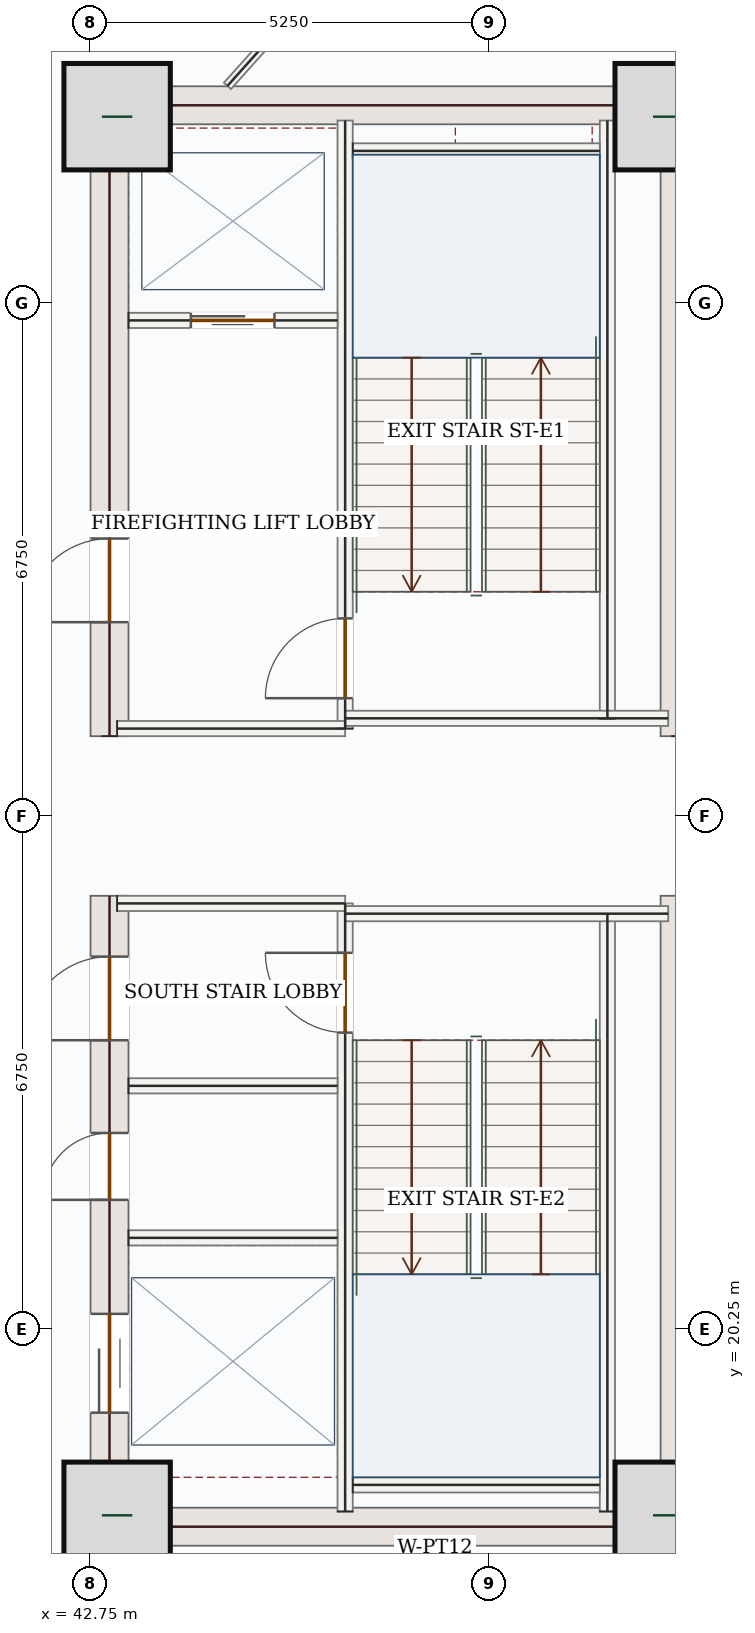
"""IFC4 building model, lengths in metres.
Left out: names, types, materials, properties, quantities, classifications, styles, units other than length and angle.
Written with IfcOpenShell. Run it as: python <this file> out.ifc"""

import sys

from ifc_helpers import new_model, si_unit, direction, frame, frame_2d, origin, origin_2d, place, context, subcontext, project, spatial, rectangle, extrude, source, transform, mapped, element, fill, save


model = new_model("IFC4")
c1 = context("Model", 3, precision=1e-05, world=origin(), true_north=direction((0.0, 1.0)))
c2 = subcontext(c1, "Body", "Model", "MODEL_VIEW")
j1 = project(units=[si_unit("LENGTHUNIT", "METRE"), si_unit("PLANEANGLEUNIT", "RADIAN")], contexts=[c1])
p1 = place(None, origin())
s1 = spatial("IfcSite", under=j1, at=p1, CompositionType="ELEMENT")
p2 = place(p1, origin())
s2 = spatial("IfcBuilding", under=s1, at=p2, CompositionType="ELEMENT")
p3 = place(p2, frame((0.0, 0.0, 75.3)))
s3 = spatial("IfcBuildingStorey", under=s2, at=p3, CompositionType="ELEMENT", Elevation=75.3)
p4 = place(p3, frame((43.0, 17.4, 0.0), z_axis=(0.0, 0.0, 1.0), x_axis=(0.0, 1.0, 0.0)))
e1 = element("IfcWall", 1, at=p4, inside=s3, PredefinedType="SHEAR", context=c2, shape_type="SweptSolid", body=[
    extrude(rectangle(XDim=8.55, YDim=0.5, at=frame_2d((4.275, 0.0))), origin(), (0.0, 0.0, 1.0), 3.95),
])
p5 = place(p4, frame((6.65, 0.0, 0.0)))
e2 = element("IfcOpeningElement", 2, at=p5, cuts=e1, PredefinedType="OPENING", context=c2, shape_type="SweptSolid", body=[
    extrude(rectangle(XDim=1.1, YDim=2.2, at=frame_2d((0.55, 1.1))), frame((0.0, 0.26, 0.0), z_axis=(0.0, -1.0, 0.0), x_axis=(1.0, 0.0, 0.0)), (0.0, 0.0, 1.0), 0.52),
])
p6 = place(p4, frame((1.75, 0.0, 0.0)))
e3 = element("IfcOpeningElement", 3, at=p6, cuts=e1, PredefinedType="OPENING", context=c2, shape_type="SweptSolid", body=[
    extrude(rectangle(XDim=1.3, YDim=2.2, at=frame_2d((0.65, 1.1))), frame((0.0, 0.26, 0.0), z_axis=(0.0, -1.0, 0.0), x_axis=(1.0, 0.0, 0.0)), (0.0, 0.0, 1.0), 0.52),
])
p7 = place(p4, frame((4.55, 0.0, 0.0)))
e4 = element("IfcOpeningElement", 4, at=p7, cuts=e1, PredefinedType="OPENING", context=c2, shape_type="SweptSolid", body=[
    extrude(rectangle(XDim=0.88, YDim=2.1, at=frame_2d((0.44, 1.05))), frame((0.0, 0.26, 0.0), z_axis=(0.0, -1.0, 0.0), x_axis=(1.0, 0.0, 0.0)), (0.0, 0.0, 1.0), 0.52),
])
p8 = place(p3, frame((43.0, 28.05, 0.0), z_axis=(0.0, 0.0, 1.0), x_axis=(0.0, 1.0, 0.0)))
e5 = element("IfcWall", 5, at=p8, inside=s3, PredefinedType="SHEAR", context=c2, shape_type="SweptSolid", body=[
    extrude(rectangle(XDim=8.55, YDim=0.5, at=frame_2d((4.275, 0.0))), origin(), (0.0, 0.0, 1.0), 3.95),
])
p9 = place(p8, frame((1.5, 0.0, 0.0)))
e6 = element("IfcOpeningElement", 6, at=p9, cuts=e5, PredefinedType="OPENING", context=c2, shape_type="SweptSolid", body=[
    extrude(rectangle(XDim=1.1, YDim=2.2, at=frame_2d((0.55, 1.1))), frame((0.0, 0.26, 0.0), z_axis=(0.0, -1.0, 0.0), x_axis=(1.0, 0.0, 0.0)), (0.0, 0.0, 1.0), 0.52),
])
m1 = source(origin(), c2, "Body", "SweptSolid", [
    extrude(rectangle(XDim=8.55, YDim=0.5, at=frame_2d((4.275, 0.0))), origin(), (0.0, 0.0, 1.0), 3.95),
])
for number, where, z_axis, x_axis in (
    (7, (50.5, 17.4, 0.0), (0.0, 0.0, 1.0), (0.0, 1.0, 0.0)),
    (8, (50.5, 28.05, 0.0), (0.0, 0.0, 1.0), (0.0, 1.0, 0.0)),
):
    element("IfcWall", number, at=place(p3, frame(where, z_axis=z_axis, x_axis=x_axis)), inside=s3, PredefinedType="SHEAR", context=c2, shape_type="MappedRepresentation", body=[
        mapped(m1, transform((0.0, 0.0, 0.0), x_axis=(1.0, 0.0, 0.0), y_axis=(0.0, 1.0, 0.0), z_axis=(0.0, 0.0, 1.0), scale=1.0)),
    ])
m2 = source(origin(), c2, "Body", "SweptSolid", [
    extrude(rectangle(XDim=7.0, YDim=0.5, at=frame_2d((3.5, 0.0))), origin(), (0.0, 0.0, 1.0), 3.95),
])
for number, where, z_axis, x_axis in (
    (9, (43.25, 17.65, 0.0), (0.0, 0.0, 1.0), (1.0, 0.0, 0.0)),
    (10, (43.25, 36.35, 0.0), (0.0, 0.0, 1.0), (1.0, 0.0, 0.0)),
):
    element("IfcWall", number, at=place(p3, frame(where, z_axis=z_axis, x_axis=x_axis)), inside=s3, PredefinedType="SHEAR", context=c2, shape_type="MappedRepresentation", body=[
        mapped(m2, transform((0.0, 0.0, 0.0), x_axis=(1.0, 0.0, 0.0), y_axis=(0.0, 1.0, 0.0), z_axis=(0.0, 0.0, 1.0), scale=1.0)),
    ])
m3 = source(origin(), c2, "Body", "SweptSolid", [
    extrude(rectangle(XDim=1.4, YDim=1.4, at=origin_2d()), origin(), (0.0, 0.0, 1.0), 4.2),
])
for number, where, z_axis, x_axis in (
    (11, (43.1, 17.8, 0.0), (0.0, 0.0, 1.0), (1.0, 0.0, 0.0)),
    (12, (50.35, 17.8, 0.0), (0.0, 0.0, 1.0), (1.0, 0.0, 0.0)),
    (13, (43.1, 36.2, 0.0), (0.0, 0.0, 1.0), (1.0, 0.0, 0.0)),
    (14, (50.35, 36.2, 0.0), (0.0, 0.0, 1.0), (1.0, 0.0, 0.0)),
):
    element("IfcColumn", number, at=place(p3, frame(where, z_axis=z_axis, x_axis=x_axis)), inside=s3, PredefinedType="COLUMN", context=c2, shape_type="MappedRepresentation", body=[
        mapped(m3, transform((0.0, 0.0, 0.0), x_axis=(1.0, 0.0, 0.0), y_axis=(0.0, 1.0, 0.0), z_axis=(0.0, 0.0, 1.0), scale=1.0)),
    ])
p10 = place(p3, frame((53.06, 18.458, 0.0), z_axis=(0.0, 0.0, 1.0), x_axis=(-0.707106781187, -0.707106781187, 0.0)))
e15 = element("IfcWall", 15, at=p10, inside=s3, PredefinedType="SOLIDWALL", context=c2, shape_type="SweptSolid", body=[
    extrude(rectangle(XDim=5.258, YDim=0.32, at=frame_2d((2.629, 0.0))), origin(), (0.0, 0.0, 1.0), 3.95),
])
p11 = place(p10, frame((1.429, 0.0, 0.85)))
e16 = element("IfcOpeningElement", 16, at=p11, cuts=e15, PredefinedType="OPENING", context=c2, shape_type="SweptSolid", body=[
    extrude(rectangle(XDim=2.4, YDim=1.8, at=frame_2d((1.2, 0.9))), frame((0.0, 0.17, 0.0), z_axis=(0.0, -1.0, 0.0), x_axis=(1.0, 0.0, 0.0)), (0.0, 0.0, 1.0), 0.34),
])
m4 = source(origin(), c2, "Body", "SweptSolid", [
    extrude(rectangle(XDim=5.258, YDim=0.32, at=frame_2d((2.629, 0.0))), origin(), (0.0, 0.0, 1.0), 3.95),
])
p12 = place(p3, frame((49.342, 39.26, 0.0), z_axis=(0.0, 0.0, 1.0), x_axis=(0.707106781187, -0.707106781187, 0.0)))
e17 = element("IfcWall", 17, at=p12, inside=s3, PredefinedType="SOLIDWALL", context=c2, shape_type="MappedRepresentation", body=[
    mapped(m4, transform((0.0, 0.0, 0.0), x_axis=(1.0, 0.0, 0.0), y_axis=(0.0, 1.0, 0.0), z_axis=(0.0, 0.0, 1.0), scale=1.0)),
])
m5 = source(origin(), c2, "Body", "SweptSolid", [
    extrude(rectangle(XDim=7.87, YDim=0.2, at=frame_2d((3.935, 0.0))), origin(), (0.0, 0.0, 1.0), 3.95),
])
for number, where, z_axis, x_axis in (
    (18, (49.55, 17.85, 0.0), (0.0, 0.0, 1.0), (0.0, 1.0, 0.0)),
    (19, (49.55, 28.28, 0.0), (0.0, 0.0, 1.0), (0.0, 1.0, 0.0)),
):
    element("IfcWall", number, at=place(p3, frame(where, z_axis=z_axis, x_axis=x_axis)), inside=s3, PredefinedType="SOLIDWALL", context=c2, shape_type="MappedRepresentation", body=[
        mapped(m5, transform((0.0, 0.0, 0.0), x_axis=(1.0, 0.0, 0.0), y_axis=(0.0, 1.0, 0.0), z_axis=(0.0, 0.0, 1.0), scale=1.0)),
    ])
p13 = place(p3, frame((46.1, 17.85, 0.0), z_axis=(0.0, 0.0, 1.0), x_axis=(0.0, 1.0, 0.0)))
e20 = element("IfcWall", 20, at=p13, inside=s3, PredefinedType="SOLIDWALL", context=c2, shape_type="SweptSolid", body=[
    extrude(rectangle(XDim=8.0, YDim=0.2, at=frame_2d((4.0, 0.0))), origin(), (0.0, 0.0, 1.0), 3.95),
])
p14 = place(p13, frame((6.3, 0.0, 0.0)))
e21 = element("IfcOpeningElement", 21, at=p14, cuts=e20, PredefinedType="OPENING", context=c2, shape_type="SweptSolid", body=[
    extrude(rectangle(XDim=1.05, YDim=2.15, at=frame_2d((0.525, 1.075))), frame((0.0, 0.11, 0.0), z_axis=(0.0, -1.0, 0.0), x_axis=(1.0, 0.0, 0.0)), (0.0, 0.0, 1.0), 0.22),
])
p15 = place(p3, frame((46.1, 28.15, 0.0), z_axis=(0.0, 0.0, 1.0), x_axis=(0.0, 1.0, 0.0)))
e22 = element("IfcWall", 22, at=p15, inside=s3, PredefinedType="SOLIDWALL", context=c2, shape_type="SweptSolid", body=[
    extrude(rectangle(XDim=8.0, YDim=0.2, at=frame_2d((4.0, 0.0))), origin(), (0.0, 0.0, 1.0), 3.95),
])
p16 = place(p15, frame((0.4, 0.0, 0.0)))
e23 = element("IfcOpeningElement", 23, at=p16, cuts=e22, PredefinedType="OPENING", context=c2, shape_type="SweptSolid", body=[
    extrude(rectangle(XDim=1.05, YDim=2.15, at=frame_2d((0.525, 1.075))), frame((0.0, 0.11, 0.0), z_axis=(0.0, -1.0, 0.0), x_axis=(1.0, 0.0, 0.0)), (0.0, 0.0, 1.0), 0.22),
])
m6 = source(origin(), c2, "Body", "SweptSolid", [
    extrude(rectangle(XDim=3.0, YDim=0.2, at=frame_2d((1.5, 0.0))), origin(), (0.0, 0.0, 1.0), 3.95),
])
p17 = place(p3, frame((43.1, 25.85, 0.0), z_axis=(0.0, 0.0, 1.0), x_axis=(1.0, 0.0, 0.0)))
e24 = element("IfcWall", 24, at=p17, inside=s3, PredefinedType="SOLIDWALL", context=c2, shape_type="MappedRepresentation", body=[
    mapped(m6, transform((0.0, 0.0, 0.0), x_axis=(1.0, 0.0, 0.0), y_axis=(0.0, 1.0, 0.0), z_axis=(0.0, 0.0, 1.0), scale=1.0)),
])
m7 = source(origin(), c2, "Body", "SweptSolid", [
    extrude(rectangle(XDim=4.25, YDim=0.2, at=frame_2d((2.125, 0.0))), origin(), (0.0, 0.0, 1.0), 3.95),
])
p18 = place(p3, frame((46.1, 25.715, 0.0), z_axis=(0.0, 0.0, 1.0), x_axis=(1.0, 0.0, 0.0)))
e25 = element("IfcWall", 25, at=p18, inside=s3, PredefinedType="SOLIDWALL", context=c2, shape_type="MappedRepresentation", body=[
    mapped(m7, transform((0.0, 0.0, 0.0), x_axis=(1.0, 0.0, 0.0), y_axis=(0.0, 1.0, 0.0), z_axis=(0.0, 0.0, 1.0), scale=1.0)),
])
p19 = place(p3, frame((43.1, 28.15, 0.0), z_axis=(0.0, 0.0, 1.0), x_axis=(1.0, 0.0, 0.0)))
e26 = element("IfcWall", 26, at=p19, inside=s3, PredefinedType="SOLIDWALL", context=c2, shape_type="MappedRepresentation", body=[
    mapped(m6, transform((0.0, 0.0, 0.0), x_axis=(1.0, 0.0, 0.0), y_axis=(0.0, 1.0, 0.0), z_axis=(0.0, 0.0, 1.0), scale=1.0)),
])
p20 = place(p3, frame((46.1, 28.285, 0.0), z_axis=(0.0, 0.0, 1.0), x_axis=(1.0, 0.0, 0.0)))
e27 = element("IfcWall", 27, at=p20, inside=s3, PredefinedType="SOLIDWALL", context=c2, shape_type="MappedRepresentation", body=[
    mapped(m7, transform((0.0, 0.0, 0.0), x_axis=(1.0, 0.0, 0.0), y_axis=(0.0, 1.0, 0.0), z_axis=(0.0, 0.0, 1.0), scale=1.0)),
])
m8 = source(origin(), c2, "Body", "SweptSolid", [
    extrude(rectangle(XDim=3.25, YDim=0.2, at=frame_2d((1.625, 0.0))), origin(), (0.0, 0.0, 1.0), 3.95),
])
for number, where, z_axis, x_axis in (
    (28, (46.2, 35.75, 0.0), (0.0, 0.0, 1.0), (1.0, 0.0, 0.0)),
    (29, (46.2, 18.2, 0.0), (0.0, 0.0, 1.0), (1.0, 0.0, 0.0)),
):
    element("IfcWall", number, at=place(p3, frame(where, z_axis=z_axis, x_axis=x_axis)), inside=s3, PredefinedType="SOLIDWALL", context=c2, shape_type="MappedRepresentation", body=[
        mapped(m8, transform((0.0, 0.0, 0.0), x_axis=(1.0, 0.0, 0.0), y_axis=(0.0, 1.0, 0.0), z_axis=(0.0, 0.0, 1.0), scale=1.0)),
    ])
p21 = place(p3, frame((43.25, 33.52, 0.0), z_axis=(0.0, 0.0, 1.0), x_axis=(1.0, 0.0, 0.0)))
e30 = element("IfcWall", 30, at=p21, inside=s3, PredefinedType="SOLIDWALL", context=c2, shape_type="SweptSolid", body=[
    extrude(rectangle(XDim=2.75, YDim=0.2, at=frame_2d((1.375, 0.0))), origin(), (0.0, 0.0, 1.0), 3.95),
])
p22 = place(p21, frame((0.82, 0.0, 0.0)))
e31 = element("IfcOpeningElement", 31, at=p22, cuts=e30, PredefinedType="OPENING", context=c2, shape_type="SweptSolid", body=[
    extrude(rectangle(XDim=1.1, YDim=2.15, at=frame_2d((0.55, 1.075))), frame((0.0, 0.11, 0.0), z_axis=(0.0, -1.0, 0.0), x_axis=(1.0, 0.0, 0.0)), (0.0, 0.0, 1.0), 0.22),
])
m9 = source(origin(), c2, "Body", "SweptSolid", [
    extrude(rectangle(XDim=2.75, YDim=0.2, at=frame_2d((1.375, 0.0))), origin(), (0.0, 0.0, 1.0), 3.95),
])
for number, where, z_axis, x_axis in (
    (32, (43.25, 23.45, 0.0), (0.0, 0.0, 1.0), (1.0, 0.0, 0.0)),
    (33, (43.25, 21.45, 0.0), (0.0, 0.0, 1.0), (1.0, 0.0, 0.0)),
):
    element("IfcWall", number, at=place(p3, frame(where, z_axis=z_axis, x_axis=x_axis)), inside=s3, PredefinedType="SOLIDWALL", context=c2, shape_type="MappedRepresentation", body=[
        mapped(m9, transform((0.0, 0.0, 0.0), x_axis=(1.0, 0.0, 0.0), y_axis=(0.0, 1.0, 0.0), z_axis=(0.0, 0.0, 1.0), scale=1.0)),
    ])
m10 = source(origin(), c2, "Body", "SweptSolid", [
    extrude(rectangle(XDim=1.099, YDim=0.125, at=frame_2d((0.549, 0.0))), origin(), (0.0, 0.0, 1.0), 3.95),
])
p23 = place(p3, frame((46.871, 17.395, 0.0), z_axis=(0.0, 0.0, 1.0), x_axis=(0.750977912422, -0.660327324177, 0.0)))
e34 = element("IfcWall", 34, at=p23, inside=s3, PredefinedType="PARTITIONING", context=c2, shape_type="MappedRepresentation", body=[
    mapped(m10, transform((0.0, 0.0, 0.0), x_axis=(1.0, 0.0, 0.0), y_axis=(0.0, 1.0, 0.0), z_axis=(0.0, 0.0, 1.0), scale=1.0)),
])
m11 = source(origin(), c2, "Body", "SweptSolid", [
    extrude(rectangle(XDim=3.348, YDim=0.125, at=frame_2d((1.674, 0.0))), origin(), (0.0, 0.0, 1.0), 3.95),
])
p24 = place(p3, frame((46.785, 39.099, 0.0), z_axis=(0.0, 0.0, 1.0), x_axis=(-0.667206176518, -0.74487308853, 0.0)))
e35 = element("IfcWall", 35, at=p24, inside=s3, PredefinedType="PARTITIONING", context=c2, shape_type="MappedRepresentation", body=[
    mapped(m11, transform((0.0, 0.0, 0.0), x_axis=(1.0, 0.0, 0.0), y_axis=(0.0, 1.0, 0.0), z_axis=(0.0, 0.0, 1.0), scale=1.0)),
])
m12 = source(origin(), c2, "Body", "SweptSolid", [
    extrude(rectangle(XDim=2.4, YDim=1.8, at=frame_2d((1.2, 0.9))), frame((0.0, 0.03, 0.0), z_axis=(0.0, -1.0, 0.0), x_axis=(1.0, 0.0, 0.0)), (0.0, 0.0, 1.0), 0.06),
])
p25 = place(p11, origin())
e36 = element("IfcWindow", 36, at=p25, inside=s3, PartitioningType="DOUBLE_PANEL_VERTICAL", PredefinedType="WINDOW", context=c2, shape_type="MappedRepresentation", body=[
    mapped(m12, transform((0.0, 0.0, 0.0), x_axis=(1.0, 0.0, 0.0), y_axis=(0.0, 1.0, 0.0), z_axis=(0.0, 0.0, 1.0), scale=1.0)),
])
fill(e16, e36)
m13 = source(origin(), c2, "Body", "SweptSolid", [
    extrude(rectangle(XDim=1.05, YDim=2.15, at=frame_2d((0.525, 1.075))), frame((0.0, 0.025, 0.0), z_axis=(0.0, -1.0, 0.0), x_axis=(1.0, 0.0, 0.0)), (0.0, 0.0, 1.0), 0.05),
])
p26 = place(p16, origin())
e37 = element("IfcDoor", 37, at=p26, inside=s3, OperationType="SINGLE_SWING_LEFT", PredefinedType="DOOR", context=c2, shape_type="MappedRepresentation", body=[
    mapped(m13, transform((0.0, 0.0, 0.0), x_axis=(1.0, 0.0, 0.0), y_axis=(0.0, 1.0, 0.0), z_axis=(0.0, 0.0, 1.0), scale=1.0)),
])
fill(e23, e37)
p27 = place(p14, origin())
e38 = element("IfcDoor", 38, at=p27, inside=s3, OperationType="SINGLE_SWING_RIGHT", PredefinedType="DOOR", context=c2, shape_type="MappedRepresentation", body=[
    mapped(m13, transform((0.0, 0.0, 0.0), x_axis=(1.0, 0.0, 0.0), y_axis=(0.0, 1.0, 0.0), z_axis=(0.0, 0.0, 1.0), scale=1.0)),
])
fill(e21, e38)
m14 = source(origin(), c2, "Body", "SweptSolid", [
    extrude(rectangle(XDim=1.1, YDim=2.15, at=frame_2d((0.55, 1.075))), frame((0.0, 0.025, 0.0), z_axis=(0.0, -1.0, 0.0), x_axis=(1.0, 0.0, 0.0)), (0.0, 0.0, 1.0), 0.05),
])
p28 = place(p22, origin())
e39 = element("IfcDoor", 39, at=p28, inside=s3, OperationType="DOUBLE_DOOR_SLIDING", PredefinedType="DOOR", context=c2, shape_type="MappedRepresentation", body=[
    mapped(m14, transform((0.0, 0.0, 0.0), x_axis=(1.0, 0.0, 0.0), y_axis=(0.0, 1.0, 0.0), z_axis=(0.0, 0.0, 1.0), scale=1.0)),
])
fill(e31, e39)
m15 = source(origin(), c2, "Body", "SweptSolid", [
    extrude(rectangle(XDim=1.1, YDim=2.2, at=frame_2d((0.55, 1.1))), frame((0.0, 0.025, 0.0), z_axis=(0.0, -1.0, 0.0), x_axis=(1.0, 0.0, 0.0)), (0.0, 0.0, 1.0), 0.05),
])
p29 = place(p9, origin())
e40 = element("IfcDoor", 40, at=p29, inside=s3, OperationType="SINGLE_SWING_LEFT", PredefinedType="DOOR", context=c2, shape_type="MappedRepresentation", body=[
    mapped(m15, transform((0.0, 0.0, 0.0), x_axis=(1.0, 0.0, 0.0), y_axis=(0.0, 1.0, 0.0), z_axis=(0.0, 0.0, 1.0), scale=1.0)),
])
fill(e6, e40)
p30 = place(p5, origin())
e41 = element("IfcDoor", 41, at=p30, inside=s3, OperationType="SINGLE_SWING_LEFT", PredefinedType="DOOR", context=c2, shape_type="MappedRepresentation", body=[
    mapped(m15, transform((0.0, 0.0, 0.0), x_axis=(1.0, 0.0, 0.0), y_axis=(0.0, 1.0, 0.0), z_axis=(0.0, 0.0, 1.0), scale=1.0)),
])
fill(e2, e41)
m16 = source(origin(), c2, "Body", "SweptSolid", [
    extrude(rectangle(XDim=1.3, YDim=2.2, at=frame_2d((0.65, 1.1))), frame((0.0, 0.025, 0.0), z_axis=(0.0, -1.0, 0.0), x_axis=(1.0, 0.0, 0.0)), (0.0, 0.0, 1.0), 0.05),
])
p31 = place(p6, origin())
e42 = element("IfcDoor", 42, at=p31, inside=s3, OperationType="DOUBLE_DOOR_SLIDING", PredefinedType="DOOR", context=c2, shape_type="MappedRepresentation", body=[
    mapped(m16, transform((0.0, 0.0, 0.0), x_axis=(1.0, 0.0, 0.0), y_axis=(0.0, 1.0, 0.0), z_axis=(0.0, 0.0, 1.0), scale=1.0)),
])
fill(e3, e42)
m17 = source(origin(), c2, "Body", "SweptSolid", [
    extrude(rectangle(XDim=0.88, YDim=2.1, at=frame_2d((0.44, 1.05))), frame((0.0, 0.025, 0.0), z_axis=(0.0, -1.0, 0.0), x_axis=(1.0, 0.0, 0.0)), (0.0, 0.0, 1.0), 0.05),
])
p32 = place(p7, origin())
e43 = element("IfcDoor", 43, at=p32, inside=s3, OperationType="SINGLE_SWING_LEFT", PredefinedType="DOOR", context=c2, shape_type="MappedRepresentation", body=[
    mapped(m17, transform((0.0, 0.0, 0.0), x_axis=(1.0, 0.0, 0.0), y_axis=(0.0, 1.0, 0.0), z_axis=(0.0, 0.0, 1.0), scale=1.0)),
])
fill(e4, e43)
save(model, sys.argv[1])
